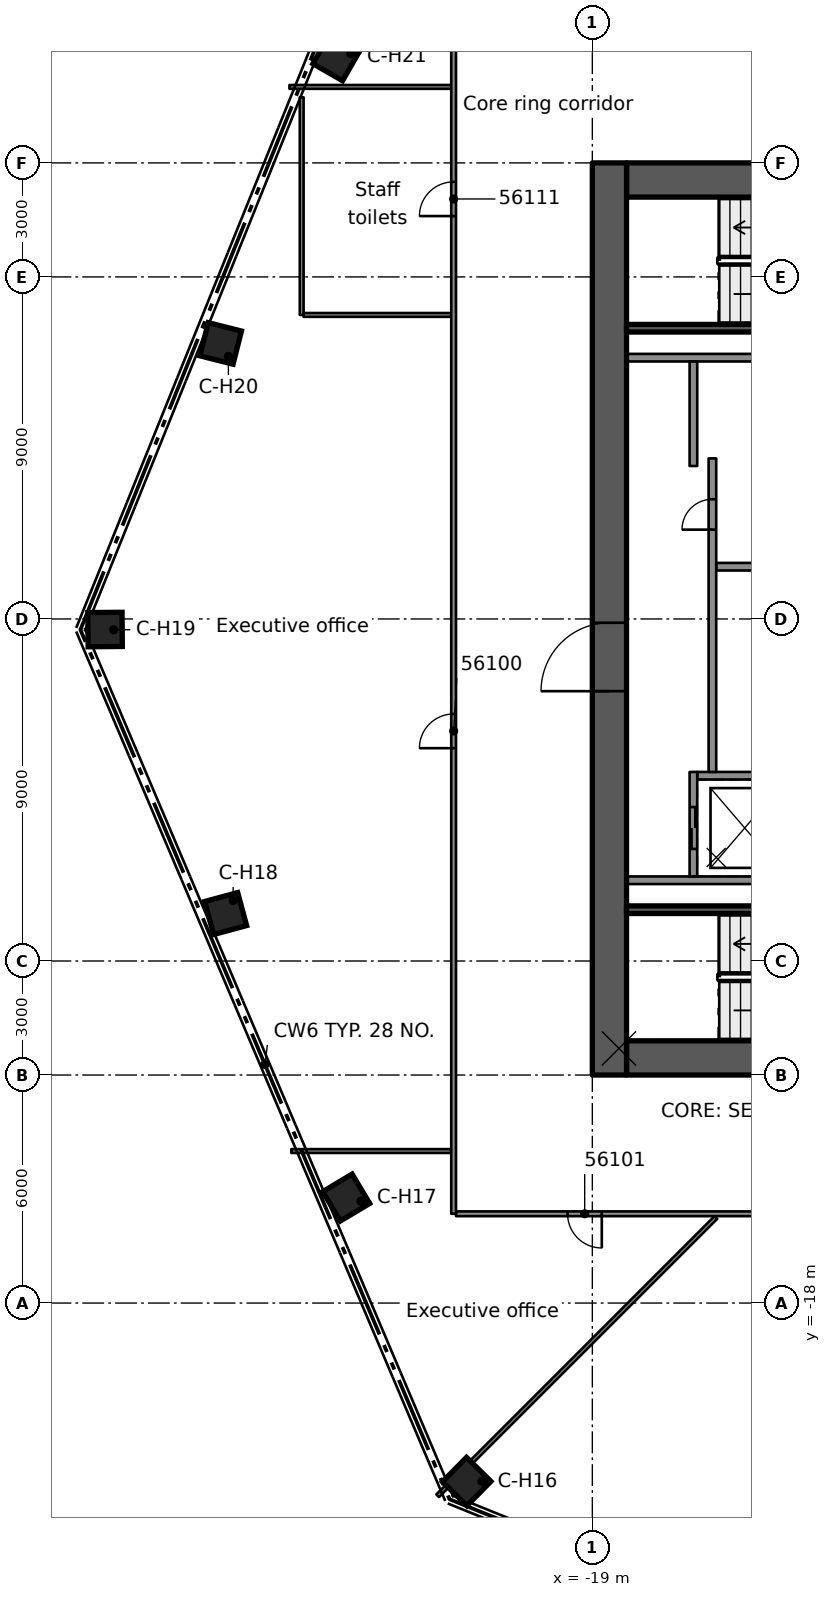
"""IFC4 building model, lengths in metres.
Left out: names, types, materials, properties, quantities, classifications, styles, units other than length and angle.
Written with IfcOpenShell. Run it as: python <this file> out.ifc"""

import sys

from ifc_helpers import new_model, si_unit, direction, frame, frame_2d, origin, origin_2d, place, context, subcontext, project, spatial, rectangle, extrude, element, fill, save


model = new_model("IFC4")
c1 = context("Model", 3, precision=1e-05, world=origin(), true_north=direction((0.0, 1.0)))
c2 = subcontext(c1, "Body", "Model", "MODEL_VIEW")
j1 = project(units=[si_unit("LENGTHUNIT", "METRE"), si_unit("PLANEANGLEUNIT", "RADIAN")], contexts=[c1])
p1 = place(None, origin())
s1 = spatial("IfcSite", under=j1, at=p1, CompositionType="ELEMENT")
p2 = place(p1, origin())
s2 = spatial("IfcBuilding", under=s1, at=p2, CompositionType="ELEMENT")
p3 = place(p2, frame((0.0, 0.0, 278.9)))
s3 = spatial("IfcBuildingStorey", under=s2, at=p3, CompositionType="ELEMENT", Elevation=278.9)
p4 = place(p3, frame((-18.1, 11.55, 0.0), z_axis=(0.0, 0.0, 1.0), x_axis=(1.0, 0.0, 0.0)))
e1 = element("IfcWall", 1, at=p4, inside=s3, PredefinedType="SHEAR", context=c2, shape_type="SweptSolid", body=[
    extrude(rectangle(XDim=9.2, YDim=0.9, at=frame_2d((4.6, 0.0))), origin(), (0.0, 0.0, 1.0), 3.5),
])
p5 = place(p4, frame((5.1, 0.0, 0.0)))
e2 = element("IfcOpeningElement", 2, at=p5, cuts=e1, PredefinedType="OPENING", context=c2, shape_type="SweptSolid", body=[
    extrude(rectangle(XDim=1.1, YDim=2.1, at=frame_2d((0.55, 1.05))), frame((0.0, 0.46, 0.0), z_axis=(0.0, -1.0, 0.0), x_axis=(1.0, 0.0, 0.0)), (0.0, 0.0, 1.0), 0.92),
])
p6 = place(p3, frame((-18.1, -11.55, 0.0), z_axis=(0.0, 0.0, 1.0), x_axis=(1.0, 0.0, 0.0)))
e3 = element("IfcWall", 3, at=p6, inside=s3, PredefinedType="SHEAR", context=c2, shape_type="SweptSolid", body=[
    extrude(rectangle(XDim=9.2, YDim=0.9, at=frame_2d((4.6, 0.0))), origin(), (0.0, 0.0, 1.0), 3.5),
])
p7 = place(p6, frame((5.1, 0.0, 0.0)))
e4 = element("IfcOpeningElement", 4, at=p7, cuts=e3, PredefinedType="OPENING", context=c2, shape_type="SweptSolid", body=[
    extrude(rectangle(XDim=1.1, YDim=2.1, at=frame_2d((0.55, 1.05))), frame((0.0, 0.46, 0.0), z_axis=(0.0, -1.0, 0.0), x_axis=(1.0, 0.0, 0.0)), (0.0, 0.0, 1.0), 0.92),
])
p8 = place(p3, frame((-18.55, -12.0, 0.0), z_axis=(0.0, 0.0, 1.0), x_axis=(0.0, 1.0, 0.0)))
e5 = element("IfcWall", 5, at=p8, inside=s3, PredefinedType="SHEAR", context=c2, shape_type="SweptSolid", body=[
    extrude(rectangle(XDim=24.0, YDim=0.9, at=frame_2d((12.0, 0.0))), origin(), (0.0, 0.0, 1.0), 3.5),
])
p9 = place(p8, frame((10.1, 0.0, 0.0)))
e6 = element("IfcOpeningElement", 6, at=p9, cuts=e5, PredefinedType="OPENING", context=c2, shape_type="SweptSolid", body=[
    extrude(rectangle(XDim=1.8, YDim=2.1, at=frame_2d((0.9, 1.05))), frame((0.0, 0.46, 0.0), z_axis=(0.0, -1.0, 0.0), x_axis=(1.0, 0.0, 0.0)), (0.0, 0.0, 1.0), 0.92),
])
for number, where, z_axis, x_axis in (
    (7, (-22.305, -22.697, 0.0), (0.0, 0.0, 1.0), (-0.701, -0.713, 0.0)),
    (8, (-25.477, -15.224, 0.0), (0.0, 0.0, 1.0), (-0.858, -0.513, 0.0)),
    (9, (-28.649, -7.751, 0.0), (0.0, 0.0, 1.0), (-0.965, -0.261, 0.0)),
    (10, (-31.821, -0.278, 0.0), (0.0, 0.0, 1.0), (-1.0, -0.009, 0.0)),
    (11, (-28.78, 7.25, 0.0), (0.0, 0.0, 1.0), (-0.97, 0.244, 0.0)),
    (12, (-25.739, 14.777, 0.0), (0.0, 0.0, 1.0), (-0.867, 0.498, 0.0)),
):
    element("IfcColumn", number, at=place(p3, frame(where, z_axis=z_axis, x_axis=x_axis)), inside=s3, PredefinedType="COLUMN", context=c2, shape_type="SweptSolid", body=[
        extrude(rectangle(XDim=0.9, YDim=0.9, at=origin_2d()), origin(), (0.0, 0.0, 1.0), 3.5),
    ])
for number, where, z_axis, x_axis in (
    (13, (-11.54, 6.875, 0.0), (0.0, 0.0, 1.0), (-1.0, 0.0, 0.0)),
    (14, (-11.54, -6.875, 0.0), (0.0, 0.0, 1.0), (-1.0, 0.0, 0.0)),
):
    element("IfcWall", number, at=place(p3, frame(where, z_axis=z_axis, x_axis=x_axis)), inside=s3, PredefinedType="SOLIDWALL", context=c2, shape_type="SweptSolid", body=[
        extrude(rectangle(XDim=6.56, YDim=0.2, at=frame_2d((3.28, 0.0))), origin(), (0.0, 0.0, 1.0), 3.09),
    ])
p10 = place(p3, frame((-11.54, -4.125, 0.0), z_axis=(0.0, 0.0, 1.0), x_axis=(-1.0, 0.0, 0.0)))
e15 = element("IfcWall", 15, at=p10, inside=s3, PredefinedType="SOLIDWALL", context=c2, shape_type="SweptSolid", body=[
    extrude(rectangle(XDim=4.7, YDim=0.2, at=frame_2d((2.35, 0.0))), origin(), (0.0, 0.0, 1.0), 3.09),
])
p11 = place(p3, frame((-11.54, 1.375, 0.0), z_axis=(0.0, 0.0, 1.0), x_axis=(-1.0, 0.0, 0.0)))
e16 = element("IfcWall", 16, at=p11, inside=s3, PredefinedType="SOLIDWALL", context=c2, shape_type="SweptSolid", body=[
    extrude(rectangle(XDim=4.2, YDim=0.2, at=frame_2d((2.1, 0.0))), origin(), (0.0, 0.0, 1.0), 3.09),
])
p12 = place(p3, frame((-16.34, -6.775, 0.0), z_axis=(0.0, 0.0, 1.0), x_axis=(0.0, 1.0, 0.0)))
e17 = element("IfcWall", 17, at=p12, inside=s3, PredefinedType="SOLIDWALL", context=c2, shape_type="SweptSolid", body=[
    extrude(rectangle(XDim=2.75, YDim=0.2, at=frame_2d((1.375, 0.0))), origin(), (0.0, 0.0, 1.0), 3.09),
])
p13 = place(p12, frame((0.725, 0.0, 0.0)))
e18 = element("IfcOpeningElement", 18, at=p13, cuts=e17, PredefinedType="OPENING", context=c2, shape_type="SweptSolid", body=[
    extrude(rectangle(XDim=1.1, YDim=2.1, at=frame_2d((0.55, 1.05))), frame((0.0, 0.11, 0.0), z_axis=(0.0, -1.0, 0.0), x_axis=(1.0, 0.0, 0.0)), (0.0, 0.0, 1.0), 0.22),
])
p14 = place(p3, frame((-15.84, -4.025, 0.0), z_axis=(0.0, 0.0, 1.0), x_axis=(0.0, 1.0, 0.0)))
e19 = element("IfcWall", 19, at=p14, inside=s3, PredefinedType="SOLIDWALL", context=c2, shape_type="SweptSolid", body=[
    extrude(rectangle(XDim=8.25, YDim=0.2, at=frame_2d((4.125, 0.0))), origin(), (0.0, 0.0, 1.0), 3.09),
])
p15 = place(p14, frame((6.375, 0.0, 0.0)))
e20 = element("IfcOpeningElement", 20, at=p15, cuts=e19, PredefinedType="OPENING", context=c2, shape_type="SweptSolid", body=[
    extrude(rectangle(XDim=0.8, YDim=2.1, at=frame_2d((0.4, 1.05))), frame((0.0, 0.11, 0.0), z_axis=(0.0, -1.0, 0.0), x_axis=(1.0, 0.0, 0.0)), (0.0, 0.0, 1.0), 0.22),
])
p16 = place(p3, frame((-16.34, 4.025, 0.0), z_axis=(0.0, 0.0, 1.0), x_axis=(0.0, 1.0, 0.0)))
e21 = element("IfcWall", 21, at=p16, inside=s3, PredefinedType="SOLIDWALL", context=c2, shape_type="SweptSolid", body=[
    extrude(rectangle(XDim=2.75, YDim=0.2, at=frame_2d((1.375, 0.0))), origin(), (0.0, 0.0, 1.0), 3.09),
])
for number, where, z_axis, x_axis in (
    (22, (-11.54, 7.65, 0.0), (0.0, 0.0, 1.0), (-1.0, 0.0, 0.0)),
    (23, (-11.54, -7.65, 0.0), (0.0, 0.0, 1.0), (-1.0, 0.0, 0.0)),
):
    element("IfcWall", number, at=place(p3, frame(where, z_axis=z_axis, x_axis=x_axis)), inside=s3, PredefinedType="SOLIDWALL", context=c2, shape_type="SweptSolid", body=[
        extrude(rectangle(XDim=6.56, YDim=0.2, at=frame_2d((3.28, 0.0))), origin(), (0.0, 0.0, 1.0), 3.09),
    ])
p17 = place(p3, frame((-12.311, -15.651, 0.0), z_axis=(0.0, 0.0, 1.0), x_axis=(-1.0, 0.0, 0.0)))
e24 = element("IfcWall", 24, at=p17, inside=s3, PredefinedType="PARTITIONING", context=c2, shape_type="SweptSolid", body=[
    extrude(rectangle(XDim=10.276, YDim=0.125, at=frame_2d((5.138, 0.0))), origin(), (0.0, 0.0, 1.0), 3.08),
])
p18 = place(p17, frame((6.44, 0.0, 0.0)))
e25 = element("IfcOpeningElement", 25, at=p18, cuts=e24, PredefinedType="OPENING", context=c2, shape_type="SweptSolid", body=[
    extrude(rectangle(XDim=0.9, YDim=2.1, at=frame_2d((0.45, 1.05))), frame((0.0, 0.073, 0.0), z_axis=(0.0, -1.0, 0.0), x_axis=(1.0, 0.0, 0.0)), (0.0, 0.0, 1.0), 0.145),
])
p19 = place(p3, frame((-26.92, -14.0, 0.0), z_axis=(0.0, 0.0, 1.0), x_axis=(1.0, 0.0, 0.0)))
e26 = element("IfcWall", 26, at=p19, inside=s3, PredefinedType="PARTITIONING", context=c2, shape_type="SweptSolid", body=[
    extrude(rectangle(XDim=4.208, YDim=0.1, at=frame_2d((2.104, 0.0))), origin(), (0.0, 0.0, 1.0), 3.08),
])
p20 = place(p3, frame((-26.598, 8.0, 0.0), z_axis=(0.0, 0.0, 1.0), x_axis=(1.0, 0.0, 0.0)))
e27 = element("IfcWall", 27, at=p20, inside=s3, PredefinedType="PARTITIONING", context=c2, shape_type="SweptSolid", body=[
    extrude(rectangle(XDim=3.886, YDim=0.1, at=frame_2d((1.943, 0.0))), origin(), (0.0, 0.0, 1.0), 3.08),
])
p21 = place(p3, frame((-26.97, 14.0, 0.0), z_axis=(0.0, 0.0, 1.0), x_axis=(1.0, 0.0, 0.0)))
e28 = element("IfcWall", 28, at=p21, inside=s3, PredefinedType="PARTITIONING", context=c2, shape_type="SweptSolid", body=[
    extrude(rectangle(XDim=4.258, YDim=0.1, at=frame_2d((2.129, 0.0))), origin(), (0.0, 0.0, 1.0), 3.08),
])
p22 = place(p3, frame((-23.07, -23.07, 0.0), z_axis=(0.0, 0.0, 1.0), x_axis=(0.707106781187, 0.707106781187, 0.0)))
e29 = element("IfcWall", 29, at=p22, inside=s3, PredefinedType="PARTITIONING", context=c2, shape_type="SweptSolid", body=[
    extrude(rectangle(XDim=10.354, YDim=0.1, at=frame_2d((5.177, 0.0))), origin(), (0.0, 0.0, 1.0), 3.08),
])
p23 = place(p3, frame((-22.65, -15.651, 0.0), z_axis=(0.0, 0.0, 1.0), x_axis=(0.0, 1.0, 0.0)))
e30 = element("IfcWall", 30, at=p23, inside=s3, PredefinedType="PARTITIONING", context=c2, shape_type="SweptSolid", body=[
    extrude(rectangle(XDim=31.302, YDim=0.125, at=frame_2d((15.651, 0.0))), origin(), (0.0, 0.0, 1.0), 3.08),
])
p24 = place(p23, frame((12.251, 0.0, 0.0)))
e31 = element("IfcOpeningElement", 31, at=p24, cuts=e30, PredefinedType="OPENING", context=c2, shape_type="SweptSolid", body=[
    extrude(rectangle(XDim=0.9, YDim=2.1, at=frame_2d((0.45, 1.05))), frame((0.0, 0.073, 0.0), z_axis=(0.0, -1.0, 0.0), x_axis=(1.0, 0.0, 0.0)), (0.0, 0.0, 1.0), 0.145),
])
p25 = place(p23, frame((26.252, 0.0, 0.0)))
e32 = element("IfcOpeningElement", 32, at=p25, cuts=e30, PredefinedType="OPENING", context=c2, shape_type="SweptSolid", body=[
    extrude(rectangle(XDim=0.9, YDim=2.1, at=frame_2d((0.45, 1.05))), frame((0.0, 0.073, 0.0), z_axis=(0.0, -1.0, 0.0), x_axis=(1.0, 0.0, 0.0)), (0.0, 0.0, 1.0), 0.145),
])
p26 = place(p3, frame((-26.648, 8.0, 0.0), z_axis=(0.0, 0.0, 1.0), x_axis=(0.0, 1.0, 0.0)))
e33 = element("IfcWall", 33, at=p26, inside=s3, PredefinedType="PARTITIONING", context=c2, shape_type="SweptSolid", body=[
    extrude(rectangle(XDim=5.727, YDim=0.1, at=frame_2d((2.864, 0.0))), origin(), (0.0, 0.0, 1.0), 3.08),
])
p27 = place(p13, origin())
e34 = element("IfcDoor", 34, at=p27, inside=s3, OperationType="DOUBLE_DOOR_SLIDING", PredefinedType="DOOR", context=c2, shape_type="SweptSolid", body=[
    extrude(rectangle(XDim=1.1, YDim=2.1, at=frame_2d((0.55, 1.05))), frame((0.0, 0.025, 0.0), z_axis=(0.0, -1.0, 0.0), x_axis=(1.0, 0.0, 0.0)), (0.0, 0.0, 1.0), 0.05),
])
fill(e18, e34)
p28 = place(p15, origin())
e35 = element("IfcDoor", 35, at=p28, inside=s3, OperationType="SINGLE_SWING_LEFT", PredefinedType="DOOR", context=c2, shape_type="SweptSolid", body=[
    extrude(rectangle(XDim=0.8, YDim=2.1, at=frame_2d((0.4, 1.05))), frame((0.0, 0.025, 0.0), z_axis=(0.0, -1.0, 0.0), x_axis=(1.0, 0.0, 0.0)), (0.0, 0.0, 1.0), 0.05),
])
fill(e20, e35)
p29 = place(p9, origin())
e36 = element("IfcDoor", 36, at=p29, inside=s3, OperationType="SINGLE_SWING_LEFT", PredefinedType="DOOR", context=c2, shape_type="SweptSolid", body=[
    extrude(rectangle(XDim=1.8, YDim=2.1, at=frame_2d((0.9, 1.05))), frame((0.0, 0.025, 0.0), z_axis=(0.0, -1.0, 0.0), x_axis=(1.0, 0.0, 0.0)), (0.0, 0.0, 1.0), 0.05),
])
fill(e6, e36)
p30 = place(p24, origin())
e37 = element("IfcDoor", 37, at=p30, inside=s3, OperationType="SINGLE_SWING_LEFT", PredefinedType="DOOR", context=c2, shape_type="SweptSolid", body=[
    extrude(rectangle(XDim=0.9, YDim=2.1, at=frame_2d((0.45, 1.05))), frame((0.0, 0.025, 0.0), z_axis=(0.0, -1.0, 0.0), x_axis=(1.0, 0.0, 0.0)), (0.0, 0.0, 1.0), 0.05),
])
fill(e31, e37)
p31 = place(p18, origin())
e38 = element("IfcDoor", 38, at=p31, inside=s3, OperationType="SINGLE_SWING_RIGHT", PredefinedType="DOOR", context=c2, shape_type="SweptSolid", body=[
    extrude(rectangle(XDim=0.9, YDim=2.1, at=frame_2d((0.45, 1.05))), frame((0.0, 0.025, 0.0), z_axis=(0.0, -1.0, 0.0), x_axis=(1.0, 0.0, 0.0)), (0.0, 0.0, 1.0), 0.05),
])
fill(e25, e38)
p32 = place(p25, origin())
e39 = element("IfcDoor", 39, at=p32, inside=s3, OperationType="SINGLE_SWING_RIGHT", PredefinedType="DOOR", context=c2, shape_type="SweptSolid", body=[
    extrude(rectangle(XDim=0.9, YDim=2.1, at=frame_2d((0.45, 1.05))), frame((0.0, 0.025, 0.0), z_axis=(0.0, -1.0, 0.0), x_axis=(1.0, 0.0, 0.0)), (0.0, 0.0, 1.0), 0.05),
])
fill(e32, e39)
save(model, sys.argv[1])
